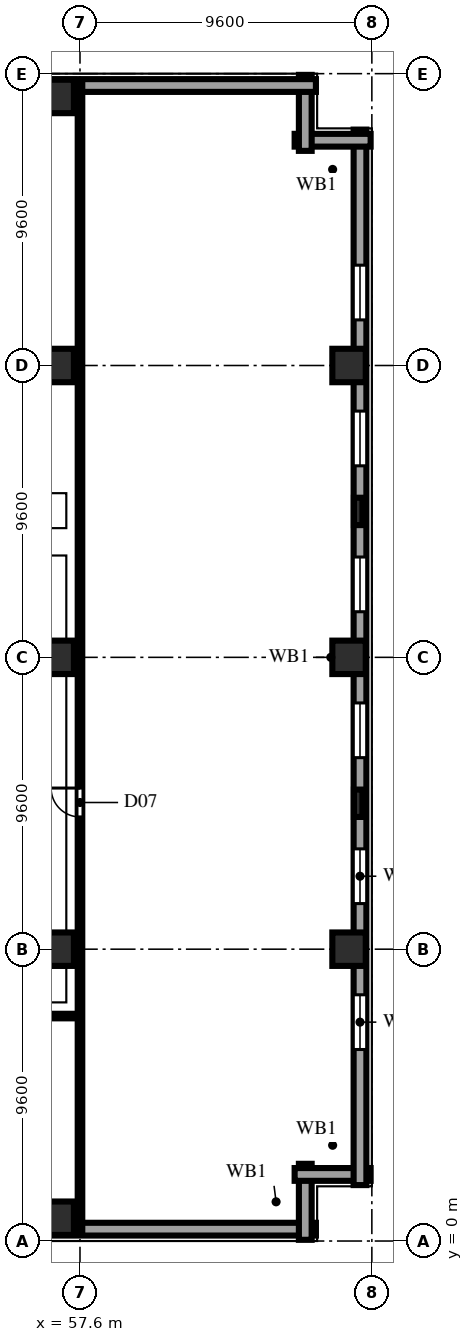
"""IFC4 building model, lengths in metres.
Left out: names, types, materials, properties, quantities, classifications, styles, units other than length and angle.
Written with IfcOpenShell. Run it as: python <this file> out.ifc"""

import sys

from ifc_helpers import new_model, si_unit, direction, frame, frame_2d, origin, origin_2d, place, context, subcontext, project, spatial, rectangle, extrude, element, fill, save


model = new_model("IFC4")
c1 = context("Model", 3, precision=1e-05, world=origin(), true_north=direction((0.0, 1.0)))
c2 = subcontext(c1, "Body", "Model", "MODEL_VIEW")
j1 = project(units=[si_unit("LENGTHUNIT", "METRE"), si_unit("PLANEANGLEUNIT", "RADIAN")], contexts=[c1])
p1 = place(None, origin())
s1 = spatial("IfcSite", under=j1, at=p1, CompositionType="ELEMENT")
p2 = place(p1, origin())
s2 = spatial("IfcBuilding", under=s1, at=p2, CompositionType="ELEMENT")
p3 = place(p2, frame((0.0, 0.0, 81.2)))
s3 = spatial("IfcBuildingStorey", under=s2, at=p3, CompositionType="ELEMENT", Elevation=81.2)
for number, where, z_axis, x_axis in (
    (1, (56.85, 0.75, 0.0), (0.0, 0.0, 1.0), (1.0, 0.0, 0.0)),
    (2, (56.85, 9.6, 0.0), (0.0, 0.0, 1.0), (1.0, 0.0, 0.0)),
    (3, (56.85, 19.2, 0.0), (0.0, 0.0, 1.0), (1.0, 0.0, 0.0)),
    (4, (56.85, 28.8, 0.0), (0.0, 0.0, 1.0), (1.0, 0.0, 0.0)),
    (5, (56.85, 37.65, 0.0), (0.0, 0.0, 1.0), (1.0, 0.0, 0.0)),
    (6, (66.45, 9.6, 0.0), (0.0, 0.0, 1.0), (1.0, 0.0, 0.0)),
    (7, (66.45, 19.2, 0.0), (0.0, 0.0, 1.0), (1.0, 0.0, 0.0)),
    (8, (66.45, 28.8, 0.0), (0.0, 0.0, 1.0), (1.0, 0.0, 0.0)),
):
    element("IfcColumn", number, at=place(p3, frame(where, z_axis=z_axis, x_axis=x_axis)), inside=s3, PredefinedType="COLUMN", context=c2, shape_type="SweptSolid", body=[
        extrude(rectangle(XDim=1.1, YDim=1.1, at=origin_2d()), origin(), (0.0, 0.0, 1.0), 3.8),
    ])
for number, where, z_axis, x_axis in (
    (9, (66.75, 14.4, 0.0), (0.0, 0.0, 1.0), (0.0, 1.0, 0.0)),
    (10, (66.75, 24.0, 0.0), (0.0, 0.0, 1.0), (0.0, 1.0, 0.0)),
):
    element("IfcColumn", number, at=place(p3, frame(where, z_axis=z_axis, x_axis=x_axis)), inside=s3, PredefinedType="PILASTER", context=c2, shape_type="SweptSolid", body=[
        extrude(rectangle(XDim=0.9, YDim=0.28, at=origin_2d()), origin(), (0.0, 0.0, 1.0), 3.8),
    ])
p4 = place(p3, frame((1.84, 0.39, 0.0), z_axis=(0.0, 0.0, 1.0), x_axis=(1.0, 0.0, 0.0)))
e11 = element("IfcWall", 11, at=p4, inside=s3, PredefinedType="SOLIDWALL", context=c2, shape_type="SweptSolid", body=[
    extrude(rectangle(XDim=63.52, YDim=0.42, at=frame_2d((31.76, 0.0))), origin(), (0.0, 0.0, 1.0), 3.54),
])
p5 = place(p4, frame((4.16, 0.0, 0.85)))
e12 = element("IfcOpeningElement", 12, at=p5, cuts=e11, PredefinedType="OPENING", context=c2, shape_type="SweptSolid", body=[
    extrude(rectangle(XDim=2.4, YDim=1.85, at=frame_2d((1.2, 0.925))), frame((0.0, 0.222, 0.0), z_axis=(0.0, -1.0, 0.0), x_axis=(1.0, 0.0, 0.0)), (0.0, 0.0, 1.0), 0.444),
])
p6 = place(p4, frame((8.96, 0.0, 0.85)))
e13 = element("IfcOpeningElement", 13, at=p6, cuts=e11, PredefinedType="OPENING", context=c2, shape_type="SweptSolid", body=[
    extrude(rectangle(XDim=2.4, YDim=1.85, at=frame_2d((1.2, 0.925))), frame((0.0, 0.222, 0.0), z_axis=(0.0, -1.0, 0.0), x_axis=(1.0, 0.0, 0.0)), (0.0, 0.0, 1.0), 0.444),
])
p7 = place(p4, frame((13.76, 0.0, 0.85)))
e14 = element("IfcOpeningElement", 14, at=p7, cuts=e11, PredefinedType="OPENING", context=c2, shape_type="SweptSolid", body=[
    extrude(rectangle(XDim=2.4, YDim=1.85, at=frame_2d((1.2, 0.925))), frame((0.0, 0.222, 0.0), z_axis=(0.0, -1.0, 0.0), x_axis=(1.0, 0.0, 0.0)), (0.0, 0.0, 1.0), 0.444),
])
p8 = place(p4, frame((18.56, 0.0, 0.85)))
e15 = element("IfcOpeningElement", 15, at=p8, cuts=e11, PredefinedType="OPENING", context=c2, shape_type="SweptSolid", body=[
    extrude(rectangle(XDim=2.4, YDim=1.85, at=frame_2d((1.2, 0.925))), frame((0.0, 0.222, 0.0), z_axis=(0.0, -1.0, 0.0), x_axis=(1.0, 0.0, 0.0)), (0.0, 0.0, 1.0), 0.444),
])
p9 = place(p4, frame((23.36, 0.0, 0.85)))
e16 = element("IfcOpeningElement", 16, at=p9, cuts=e11, PredefinedType="OPENING", context=c2, shape_type="SweptSolid", body=[
    extrude(rectangle(XDim=2.4, YDim=1.85, at=frame_2d((1.2, 0.925))), frame((0.0, 0.222, 0.0), z_axis=(0.0, -1.0, 0.0), x_axis=(1.0, 0.0, 0.0)), (0.0, 0.0, 1.0), 0.444),
])
p10 = place(p4, frame((28.16, 0.0, 0.85)))
e17 = element("IfcOpeningElement", 17, at=p10, cuts=e11, PredefinedType="OPENING", context=c2, shape_type="SweptSolid", body=[
    extrude(rectangle(XDim=2.4, YDim=1.85, at=frame_2d((1.2, 0.925))), frame((0.0, 0.222, 0.0), z_axis=(0.0, -1.0, 0.0), x_axis=(1.0, 0.0, 0.0)), (0.0, 0.0, 1.0), 0.444),
])
for number, where, z_axis, x_axis in (
    (18, (65.01, 0.04, 0.0), (0.0, 0.0, 1.0), (0.0, 1.0, 0.0)),
    (19, (64.66, 2.19, 0.0), (0.0, 0.0, 1.0), (1.0, 0.0, 0.0)),
):
    element("IfcWall", number, at=place(p3, frame(where, z_axis=z_axis, x_axis=x_axis)), inside=s3, PredefinedType="SOLIDWALL", context=c2, shape_type="SweptSolid", body=[
        extrude(rectangle(XDim=2.5, YDim=0.42, at=frame_2d((1.25, 0.0))), origin(), (0.0, 0.0, 1.0), 3.54),
    ])
p11 = place(p3, frame((66.81, 1.84, 0.0), z_axis=(0.0, 0.0, 1.0), x_axis=(0.0, 1.0, 0.0)))
e20 = element("IfcWall", 20, at=p11, inside=s3, PredefinedType="SOLIDWALL", context=c2, shape_type="SweptSolid", body=[
    extrude(rectangle(XDim=34.72, YDim=0.42, at=frame_2d((17.36, 0.0))), origin(), (0.0, 0.0, 1.0), 3.54),
])
p12 = place(p11, frame((4.46, 0.0, 0.85)))
e21 = element("IfcOpeningElement", 21, at=p12, cuts=e20, PredefinedType="OPENING", context=c2, shape_type="SweptSolid", body=[
    extrude(rectangle(XDim=1.8, YDim=1.85, at=frame_2d((0.9, 0.925))), frame((0.0, 0.222, 0.0), z_axis=(0.0, -1.0, 0.0), x_axis=(1.0, 0.0, 0.0)), (0.0, 0.0, 1.0), 0.444),
])
p13 = place(p11, frame((9.26, 0.0, 0.85)))
e22 = element("IfcOpeningElement", 22, at=p13, cuts=e20, PredefinedType="OPENING", context=c2, shape_type="SweptSolid", body=[
    extrude(rectangle(XDim=1.8, YDim=1.85, at=frame_2d((0.9, 0.925))), frame((0.0, 0.222, 0.0), z_axis=(0.0, -1.0, 0.0), x_axis=(1.0, 0.0, 0.0)), (0.0, 0.0, 1.0), 0.444),
])
p14 = place(p11, frame((14.06, 0.0, 0.85)))
e23 = element("IfcOpeningElement", 23, at=p14, cuts=e20, PredefinedType="OPENING", context=c2, shape_type="SweptSolid", body=[
    extrude(rectangle(XDim=1.8, YDim=1.85, at=frame_2d((0.9, 0.925))), frame((0.0, 0.222, 0.0), z_axis=(0.0, -1.0, 0.0), x_axis=(1.0, 0.0, 0.0)), (0.0, 0.0, 1.0), 0.444),
])
p15 = place(p11, frame((18.86, 0.0, 0.85)))
e24 = element("IfcOpeningElement", 24, at=p15, cuts=e20, PredefinedType="OPENING", context=c2, shape_type="SweptSolid", body=[
    extrude(rectangle(XDim=1.8, YDim=1.85, at=frame_2d((0.9, 0.925))), frame((0.0, 0.222, 0.0), z_axis=(0.0, -1.0, 0.0), x_axis=(1.0, 0.0, 0.0)), (0.0, 0.0, 1.0), 0.444),
])
p16 = place(p11, frame((23.66, 0.0, 0.85)))
e25 = element("IfcOpeningElement", 25, at=p16, cuts=e20, PredefinedType="OPENING", context=c2, shape_type="SweptSolid", body=[
    extrude(rectangle(XDim=1.8, YDim=1.85, at=frame_2d((0.9, 0.925))), frame((0.0, 0.222, 0.0), z_axis=(0.0, -1.0, 0.0), x_axis=(1.0, 0.0, 0.0)), (0.0, 0.0, 1.0), 0.444),
])
p17 = place(p11, frame((28.46, 0.0, 0.85)))
e26 = element("IfcOpeningElement", 26, at=p17, cuts=e20, PredefinedType="OPENING", context=c2, shape_type="SweptSolid", body=[
    extrude(rectangle(XDim=1.8, YDim=1.85, at=frame_2d((0.9, 0.925))), frame((0.0, 0.222, 0.0), z_axis=(0.0, -1.0, 0.0), x_axis=(1.0, 0.0, 0.0)), (0.0, 0.0, 1.0), 0.444),
])
for number, where, z_axis, x_axis in (
    (27, (67.16, 36.21, 0.0), (0.0, 0.0, 1.0), (-1.0, 0.0, 0.0)),
    (28, (65.01, 35.86, 0.0), (0.0, 0.0, 1.0), (0.0, 1.0, 0.0)),
):
    element("IfcWall", number, at=place(p3, frame(where, z_axis=z_axis, x_axis=x_axis)), inside=s3, PredefinedType="SOLIDWALL", context=c2, shape_type="SweptSolid", body=[
        extrude(rectangle(XDim=2.5, YDim=0.42, at=frame_2d((1.25, 0.0))), origin(), (0.0, 0.0, 1.0), 3.54),
    ])
p18 = place(p3, frame((65.36, 38.01, 0.0), z_axis=(0.0, 0.0, 1.0), x_axis=(-1.0, 0.0, 0.0)))
e29 = element("IfcWall", 29, at=p18, inside=s3, PredefinedType="SOLIDWALL", context=c2, shape_type="SweptSolid", body=[
    extrude(rectangle(XDim=27.7, YDim=0.42, at=frame_2d((13.85, 0.0))), origin(), (0.0, 0.0, 1.0), 3.54),
])
p19 = place(p3, frame((0.22, 7.4, 0.0), z_axis=(0.0, 0.0, 1.0), x_axis=(1.0, 0.0, 0.0)))
e30 = element("IfcWall", 30, at=p19, inside=s3, PredefinedType="PARTITIONING", context=c2, shape_type="SweptSolid", body=[
    extrude(rectangle(XDim=57.38, YDim=0.15, at=frame_2d((28.69, 0.0))), origin(), (0.0, 0.0, 1.0), 3.54),
])
p20 = place(p19, frame((12.43, 0.0, 0.0)))
e31 = element("IfcOpeningElement", 31, at=p20, cuts=e30, PredefinedType="OPENING", context=c2, shape_type="SweptSolid", body=[
    extrude(rectangle(XDim=0.95, YDim=2.15, at=frame_2d((0.475, 1.075))), frame((0.0, 0.087, 0.0), z_axis=(0.0, -1.0, 0.0), x_axis=(1.0, 0.0, 0.0)), (0.0, 0.0, 1.0), 0.174),
])
p21 = place(p19, frame((23.28, 0.0, 0.0)))
e32 = element("IfcOpeningElement", 32, at=p21, cuts=e30, PredefinedType="OPENING", context=c2, shape_type="SweptSolid", body=[
    extrude(rectangle(XDim=1.0, YDim=2.2, at=frame_2d((0.5, 1.1))), frame((0.0, 0.087, 0.0), z_axis=(0.0, -1.0, 0.0), x_axis=(1.0, 0.0, 0.0)), (0.0, 0.0, 1.0), 0.174),
])
p22 = place(p19, frame((41.68, 0.0, 0.0)))
e33 = element("IfcOpeningElement", 33, at=p22, cuts=e30, PredefinedType="OPENING", context=c2, shape_type="SweptSolid", body=[
    extrude(rectangle(XDim=0.95, YDim=2.15, at=frame_2d((0.475, 1.075))), frame((0.0, 0.087, 0.0), z_axis=(0.0, -1.0, 0.0), x_axis=(1.0, 0.0, 0.0)), (0.0, 0.0, 1.0), 0.174),
])
p23 = place(p19, frame((51.33, 0.0, 0.0)))
e34 = element("IfcOpeningElement", 34, at=p23, cuts=e30, PredefinedType="OPENING", context=c2, shape_type="SweptSolid", body=[
    extrude(rectangle(XDim=1.0, YDim=2.2, at=frame_2d((0.5, 1.1))), frame((0.0, 0.087, 0.0), z_axis=(0.0, -1.0, 0.0), x_axis=(1.0, 0.0, 0.0)), (0.0, 0.0, 1.0), 0.174),
])
p24 = place(p3, frame((57.6, 0.22, 0.0), z_axis=(0.0, 0.0, 1.0), x_axis=(0.0, 1.0, 0.0)))
e35 = element("IfcWall", 35, at=p24, inside=s3, PredefinedType="PARTITIONING", context=c2, shape_type="SweptSolid", body=[
    extrude(rectangle(XDim=37.96, YDim=0.15, at=frame_2d((18.98, 0.0))), origin(), (0.0, 0.0, 1.0), 3.54),
])
p25 = place(p24, frame((13.73, 0.0, 0.0)))
e36 = element("IfcOpeningElement", 36, at=p25, cuts=e35, PredefinedType="OPENING", context=c2, shape_type="SweptSolid", body=[
    extrude(rectangle(XDim=0.95, YDim=2.15, at=frame_2d((0.475, 1.075))), frame((0.0, 0.087, 0.0), z_axis=(0.0, -1.0, 0.0), x_axis=(1.0, 0.0, 0.0)), (0.0, 0.0, 1.0), 0.174),
])
p26 = place(p12, origin())
e37 = element("IfcWindow", 37, at=p26, inside=s3, PartitioningType="DOUBLE_PANEL_VERTICAL", PredefinedType="WINDOW", context=c2, shape_type="SweptSolid", body=[
    extrude(rectangle(XDim=1.8, YDim=1.85, at=frame_2d((0.9, 0.925))), frame((0.0, 0.11, 0.0), z_axis=(0.0, -1.0, 0.0), x_axis=(1.0, 0.0, 0.0)), (0.0, 0.0, 1.0), 0.06),
])
fill(e21, e37)
p27 = place(p13, origin())
e38 = element("IfcWindow", 38, at=p27, inside=s3, PartitioningType="DOUBLE_PANEL_VERTICAL", PredefinedType="WINDOW", context=c2, shape_type="SweptSolid", body=[
    extrude(rectangle(XDim=1.8, YDim=1.85, at=frame_2d((0.9, 0.925))), frame((0.0, 0.11, 0.0), z_axis=(0.0, -1.0, 0.0), x_axis=(1.0, 0.0, 0.0)), (0.0, 0.0, 1.0), 0.06),
])
fill(e22, e38)
p28 = place(p14, origin())
e39 = element("IfcWindow", 39, at=p28, inside=s3, PartitioningType="DOUBLE_PANEL_VERTICAL", PredefinedType="WINDOW", context=c2, shape_type="SweptSolid", body=[
    extrude(rectangle(XDim=1.8, YDim=1.85, at=frame_2d((0.9, 0.925))), frame((0.0, 0.11, 0.0), z_axis=(0.0, -1.0, 0.0), x_axis=(1.0, 0.0, 0.0)), (0.0, 0.0, 1.0), 0.06),
])
fill(e23, e39)
p29 = place(p15, origin())
e40 = element("IfcWindow", 40, at=p29, inside=s3, PartitioningType="DOUBLE_PANEL_VERTICAL", PredefinedType="WINDOW", context=c2, shape_type="SweptSolid", body=[
    extrude(rectangle(XDim=1.8, YDim=1.85, at=frame_2d((0.9, 0.925))), frame((0.0, 0.11, 0.0), z_axis=(0.0, -1.0, 0.0), x_axis=(1.0, 0.0, 0.0)), (0.0, 0.0, 1.0), 0.06),
])
fill(e24, e40)
p30 = place(p16, origin())
e41 = element("IfcWindow", 41, at=p30, inside=s3, PartitioningType="DOUBLE_PANEL_VERTICAL", PredefinedType="WINDOW", context=c2, shape_type="SweptSolid", body=[
    extrude(rectangle(XDim=1.8, YDim=1.85, at=frame_2d((0.9, 0.925))), frame((0.0, 0.11, 0.0), z_axis=(0.0, -1.0, 0.0), x_axis=(1.0, 0.0, 0.0)), (0.0, 0.0, 1.0), 0.06),
])
fill(e25, e41)
p31 = place(p17, origin())
e42 = element("IfcWindow", 42, at=p31, inside=s3, PartitioningType="DOUBLE_PANEL_VERTICAL", PredefinedType="WINDOW", context=c2, shape_type="SweptSolid", body=[
    extrude(rectangle(XDim=1.8, YDim=1.85, at=frame_2d((0.9, 0.925))), frame((0.0, 0.11, 0.0), z_axis=(0.0, -1.0, 0.0), x_axis=(1.0, 0.0, 0.0)), (0.0, 0.0, 1.0), 0.06),
])
fill(e26, e42)
p32 = place(p25, origin())
e43 = element("IfcDoor", 43, at=p32, inside=s3, OperationType="SINGLE_SWING_RIGHT", PredefinedType="DOOR", context=c2, shape_type="SweptSolid", body=[
    extrude(rectangle(XDim=0.95, YDim=2.15, at=frame_2d((0.475, 1.075))), frame((0.0, 0.025, 0.0), z_axis=(0.0, -1.0, 0.0), x_axis=(1.0, 0.0, 0.0)), (0.0, 0.0, 1.0), 0.05),
])
fill(e36, e43)
save(model, sys.argv[1])
